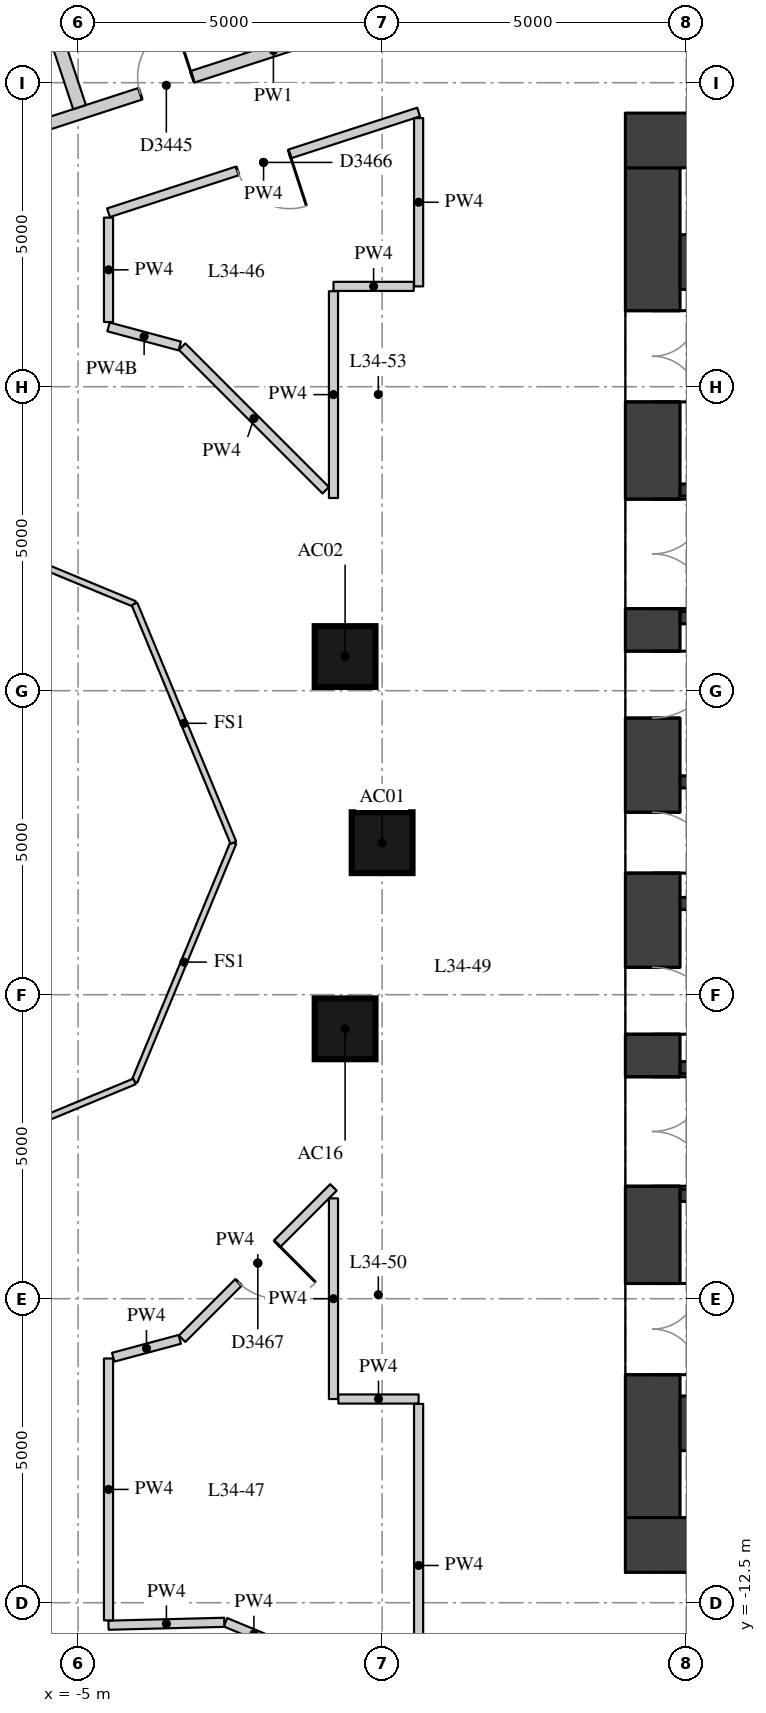
"""IFC4 building model, lengths in metres.
Left out: names, types, materials, properties, quantities, classifications, styles, units other than length and angle.
Written with IfcOpenShell. Run it as: python <this file> out.ifc"""

import sys

from ifc_helpers import new_model, si_unit, direction, frame, frame_2d, origin, origin_2d, place, context, subcontext, project, spatial, rectangle, extrude, element, fill, save


model = new_model("IFC4")
c1 = context("Model", 3, precision=1e-05, world=origin(), true_north=direction((0.0, 1.0)))
c2 = subcontext(c1, "Body", "Model", "MODEL_VIEW")
j1 = project(units=[si_unit("LENGTHUNIT", "METRE"), si_unit("PLANEANGLEUNIT", "RADIAN")], contexts=[c1])
p1 = place(None, origin())
s1 = spatial("IfcSite", under=j1, at=p1, CompositionType="ELEMENT")
p2 = place(p1, origin())
s2 = spatial("IfcBuilding", under=s1, at=p2, CompositionType="ELEMENT")
p3 = place(p2, frame((0.0, 0.0, 121.9)))
s3 = spatial("IfcBuildingStorey", under=s2, at=p3, CompositionType="ELEMENT", Elevation=121.9)
for number, where, z_axis, x_axis in (
    (1, (0.0, 0.0, 0.0), (0.0, 0.0, 1.0), (1.0, 0.0, 0.0)),
    (2, (-0.609, 3.062, 0.0), (0.0, 0.0, 1.0), (1.0, 0.0, 0.0)),
    (3, (-0.609, -3.062, 0.0), (0.0, 0.0, 1.0), (1.0, 0.0, 0.0)),
):
    element("IfcColumn", number, at=place(p3, frame(where, z_axis=z_axis, x_axis=x_axis)), inside=s3, PredefinedType="COLUMN", context=c2, shape_type="SweptSolid", body=[
        extrude(rectangle(XDim=1.0, YDim=1.0, at=origin_2d()), origin(), (0.0, 0.0, 1.0), 3.3),
    ])
p4 = place(p3, frame((4.45, -11.1, 0.0), z_axis=(0.0, 0.0, 1.0), x_axis=(0.0, 1.0, 0.0)))
e4 = element("IfcWall", 4, at=p4, inside=s3, PredefinedType="SHEAR", context=c2, shape_type="SweptSolid", body=[
    extrude(rectangle(XDim=22.2, YDim=0.9, at=frame_2d((11.1, 0.0))), origin(), (0.0, 0.0, 1.0), 3.02),
])
p5 = place(p4, frame((2.35, 0.0, 0.0)))
e5 = element("IfcOpeningElement", 5, at=p5, cuts=e4, PredefinedType="OPENING", context=c2, shape_type="SweptSolid", body=[
    extrude(rectangle(XDim=1.5, YDim=2.1, at=frame_2d((0.75, 1.05))), frame((0.0, 0.46, 0.0), z_axis=(0.0, -1.0, 0.0), x_axis=(1.0, 0.0, 0.0)), (0.0, 0.0, 1.0), 0.92),
])
p6 = place(p4, frame((5.45, 0.0, 0.0)))
e6 = element("IfcOpeningElement", 6, at=p6, cuts=e4, PredefinedType="OPENING", context=c2, shape_type="SweptSolid", body=[
    extrude(rectangle(XDim=1.8, YDim=2.1, at=frame_2d((0.9, 1.05))), frame((0.0, 0.46, 0.0), z_axis=(0.0, -1.0, 0.0), x_axis=(1.0, 0.0, 0.0)), (0.0, 0.0, 1.0), 0.92),
])
p7 = place(p4, frame((7.95, 0.0, 0.0)))
e7 = element("IfcOpeningElement", 7, at=p7, cuts=e4, PredefinedType="OPENING", context=c2, shape_type="SweptSolid", body=[
    extrude(rectangle(XDim=1.1, YDim=2.1, at=frame_2d((0.55, 1.05))), frame((0.0, 0.46, 0.0), z_axis=(0.0, -1.0, 0.0), x_axis=(1.0, 0.0, 0.0)), (0.0, 0.0, 1.0), 0.92),
])
p8 = place(p4, frame((10.6, 0.0, 0.0)))
e8 = element("IfcOpeningElement", 8, at=p8, cuts=e4, PredefinedType="OPENING", context=c2, shape_type="SweptSolid", body=[
    extrude(rectangle(XDim=1.0, YDim=2.1, at=frame_2d((0.5, 1.05))), frame((0.0, 0.46, 0.0), z_axis=(0.0, -1.0, 0.0), x_axis=(1.0, 0.0, 0.0)), (0.0, 0.0, 1.0), 0.92),
])
p9 = place(p4, frame((13.15, 0.0, 0.0)))
e9 = element("IfcOpeningElement", 9, at=p9, cuts=e4, PredefinedType="OPENING", context=c2, shape_type="SweptSolid", body=[
    extrude(rectangle(XDim=1.1, YDim=2.1, at=frame_2d((0.55, 1.05))), frame((0.0, 0.46, 0.0), z_axis=(0.0, -1.0, 0.0), x_axis=(1.0, 0.0, 0.0)), (0.0, 0.0, 1.0), 0.92),
])
p10 = place(p4, frame((14.95, 0.0, 0.0)))
e10 = element("IfcOpeningElement", 10, at=p10, cuts=e4, PredefinedType="OPENING", context=c2, shape_type="SweptSolid", body=[
    extrude(rectangle(XDim=1.8, YDim=2.1, at=frame_2d((0.9, 1.05))), frame((0.0, 0.46, 0.0), z_axis=(0.0, -1.0, 0.0), x_axis=(1.0, 0.0, 0.0)), (0.0, 0.0, 1.0), 0.92),
])
p11 = place(p4, frame((18.35, 0.0, 0.0)))
e11 = element("IfcOpeningElement", 11, at=p11, cuts=e4, PredefinedType="OPENING", context=c2, shape_type="SweptSolid", body=[
    extrude(rectangle(XDim=1.5, YDim=2.1, at=frame_2d((0.75, 1.05))), frame((0.0, 0.46, 0.0), z_axis=(0.0, -1.0, 0.0), x_axis=(1.0, 0.0, 0.0)), (0.0, 0.0, 1.0), 0.92),
])
for number, where, z_axis, x_axis in (
    (12, (4.0, 11.55, 0.0), (0.0, 0.0, 1.0), (1.0, 0.0, 0.0)),
    (13, (4.0, -11.55, 0.0), (0.0, 0.0, 1.0), (1.0, 0.0, 0.0)),
):
    element("IfcWall", number, at=place(p3, frame(where, z_axis=z_axis, x_axis=x_axis)), inside=s3, PredefinedType="SHEAR", context=c2, shape_type="SweptSolid", body=[
        extrude(rectangle(XDim=15.2, YDim=0.9, at=frame_2d((7.6, 0.0))), origin(), (0.0, 0.0, 1.0), 3.02),
    ])
for number, where, z_axis, x_axis in (
    (14, (4.9, 9.55, 0.0), (0.0, 0.0, 1.0), (1.0, 0.0, 0.0)),
    (15, (4.9, -9.55, 0.0), (0.0, 0.0, 1.0), (1.0, 0.0, 0.0)),
):
    element("IfcWall", number, at=place(p3, frame(where, z_axis=z_axis, x_axis=x_axis)), inside=s3, PredefinedType="SHEAR", context=c2, shape_type="SweptSolid", body=[
        extrude(rectangle(XDim=10.2, YDim=0.9, at=frame_2d((5.1, 0.0))), origin(), (0.0, 0.0, 1.0), 3.02),
    ])
p12 = place(p3, frame((4.9, 5.8, 0.0), z_axis=(0.0, 0.0, 1.0), x_axis=(1.0, 0.0, 0.0)))
e16 = element("IfcWall", 16, at=p12, inside=s3, PredefinedType="SHEAR", context=c2, shape_type="SweptSolid", body=[
    extrude(rectangle(XDim=10.2, YDim=0.2, at=frame_2d((5.1, 0.0))), origin(), (0.0, 0.0, 1.0), 3.02),
])
p13 = place(p12, frame((6.75, 0.0, 0.0)))
e17 = element("IfcOpeningElement", 17, at=p13, cuts=e16, PredefinedType="OPENING", context=c2, shape_type="SweptSolid", body=[
    extrude(rectangle(XDim=1.1, YDim=2.1, at=frame_2d((0.55, 1.05))), frame((0.0, 0.11, 0.0), z_axis=(0.0, -1.0, 0.0), x_axis=(1.0, 0.0, 0.0)), (0.0, 0.0, 1.0), 0.22),
])
p14 = place(p12, frame((8.75, 0.0, 0.0)))
e18 = element("IfcOpeningElement", 18, at=p14, cuts=e16, PredefinedType="OPENING", context=c2, shape_type="SweptSolid", body=[
    extrude(rectangle(XDim=1.1, YDim=2.1, at=frame_2d((0.55, 1.05))), frame((0.0, 0.11, 0.0), z_axis=(0.0, -1.0, 0.0), x_axis=(1.0, 0.0, 0.0)), (0.0, 0.0, 1.0), 0.22),
])
p15 = place(p3, frame((4.9, 3.7, 0.0), z_axis=(0.0, 0.0, 1.0), x_axis=(1.0, 0.0, 0.0)))
e19 = element("IfcWall", 19, at=p15, inside=s3, PredefinedType="SHEAR", context=c2, shape_type="SweptSolid", body=[
    extrude(rectangle(XDim=10.2, YDim=0.2, at=frame_2d((5.1, 0.0))), origin(), (0.0, 0.0, 1.0), 3.02),
])
p16 = place(p15, frame((6.3, 0.0, 0.0)))
e20 = element("IfcOpeningElement", 20, at=p16, cuts=e19, PredefinedType="OPENING", context=c2, shape_type="SweptSolid", body=[
    extrude(rectangle(XDim=1.1, YDim=2.1, at=frame_2d((0.55, 1.05))), frame((0.0, 0.11, 0.0), z_axis=(0.0, -1.0, 0.0), x_axis=(1.0, 0.0, 0.0)), (0.0, 0.0, 1.0), 0.22),
])
p17 = place(p15, frame((8.6, 0.0, 0.0)))
e21 = element("IfcOpeningElement", 21, at=p17, cuts=e19, PredefinedType="OPENING", context=c2, shape_type="SweptSolid", body=[
    extrude(rectangle(XDim=1.1, YDim=2.1, at=frame_2d((0.55, 1.05))), frame((0.0, 0.11, 0.0), z_axis=(0.0, -1.0, 0.0), x_axis=(1.0, 0.0, 0.0)), (0.0, 0.0, 1.0), 0.22),
])
for number, where, z_axis, x_axis in (
    (22, (4.9, 1.0, 0.0), (0.0, 0.0, 1.0), (1.0, 0.0, 0.0)),
    (23, (4.9, -1.0, 0.0), (0.0, 0.0, 1.0), (1.0, 0.0, 0.0)),
):
    element("IfcWall", number, at=place(p3, frame(where, z_axis=z_axis, x_axis=x_axis)), inside=s3, PredefinedType="SHEAR", context=c2, shape_type="SweptSolid", body=[
        extrude(rectangle(XDim=10.2, YDim=0.2, at=frame_2d((5.1, 0.0))), origin(), (0.0, 0.0, 1.0), 3.02),
    ])
p18 = place(p3, frame((4.9, -3.7, 0.0), z_axis=(0.0, 0.0, 1.0), x_axis=(1.0, 0.0, 0.0)))
e24 = element("IfcWall", 24, at=p18, inside=s3, PredefinedType="SHEAR", context=c2, shape_type="SweptSolid", body=[
    extrude(rectangle(XDim=10.2, YDim=0.2, at=frame_2d((5.1, 0.0))), origin(), (0.0, 0.0, 1.0), 3.02),
])
p19 = place(p18, frame((6.3, 0.0, 0.0)))
e25 = element("IfcOpeningElement", 25, at=p19, cuts=e24, PredefinedType="OPENING", context=c2, shape_type="SweptSolid", body=[
    extrude(rectangle(XDim=1.1, YDim=2.1, at=frame_2d((0.55, 1.05))), frame((0.0, 0.11, 0.0), z_axis=(0.0, -1.0, 0.0), x_axis=(1.0, 0.0, 0.0)), (0.0, 0.0, 1.0), 0.22),
])
p20 = place(p18, frame((8.6, 0.0, 0.0)))
e26 = element("IfcOpeningElement", 26, at=p20, cuts=e24, PredefinedType="OPENING", context=c2, shape_type="SweptSolid", body=[
    extrude(rectangle(XDim=1.1, YDim=2.1, at=frame_2d((0.55, 1.05))), frame((0.0, 0.11, 0.0), z_axis=(0.0, -1.0, 0.0), x_axis=(1.0, 0.0, 0.0)), (0.0, 0.0, 1.0), 0.22),
])
p21 = place(p3, frame((4.9, -5.8, 0.0), z_axis=(0.0, 0.0, 1.0), x_axis=(1.0, 0.0, 0.0)))
e27 = element("IfcWall", 27, at=p21, inside=s3, PredefinedType="SHEAR", context=c2, shape_type="SweptSolid", body=[
    extrude(rectangle(XDim=10.2, YDim=0.2, at=frame_2d((5.1, 0.0))), origin(), (0.0, 0.0, 1.0), 3.02),
])
p22 = place(p3, frame((-7.667, 11.119, 0.0), z_axis=(0.0, 0.0, 1.0), x_axis=(0.951088334028, 0.308919052304, 0.0)))
e28 = element("IfcWall", 28, at=p22, inside=s3, PredefinedType="PARTITIONING", context=c2, shape_type="SweptSolid", body=[
    extrude(rectangle(XDim=12.362, YDim=0.2, at=frame_2d((6.181, 0.0))), origin(), (0.0, 0.0, 1.0), 3.02),
])
p23 = place(p22, frame((7.686, 0.0, 0.0)))
e29 = element("IfcOpeningElement", 29, at=p23, cuts=e28, PredefinedType="OPENING", context=c2, shape_type="SweptSolid", body=[
    extrude(rectangle(XDim=1.1, YDim=2.1, at=frame_2d((0.55, 1.05))), frame((0.0, 0.11, 0.0), z_axis=(0.0, -1.0, 0.0), x_axis=(1.0, 0.0, 0.0)), (0.0, 0.0, 1.0), 0.22),
])
p24 = place(p22, frame((3.88, 0.0, 0.0)))
e30 = element("IfcOpeningElement", 30, at=p24, cuts=e28, PredefinedType="OPENING", context=c2, shape_type="SweptSolid", body=[
    extrude(rectangle(XDim=0.9, YDim=2.1, at=frame_2d((0.45, 1.05))), frame((0.0, 0.11, 0.0), z_axis=(0.0, -1.0, 0.0), x_axis=(1.0, 0.0, 0.0)), (0.0, 0.0, 1.0), 0.22),
])
p25 = place(p3, frame((-4.5, 10.361, 0.0), z_axis=(0.0, 0.0, 1.0), x_axis=(0.951090931116, 0.308911056372, 0.0)))
e31 = element("IfcWall", 31, at=p25, inside=s3, PredefinedType="PARTITIONING", context=c2, shape_type="SweptSolid", body=[
    extrude(rectangle(XDim=5.362, YDim=0.15, at=frame_2d((2.681, 0.0))), origin(), (0.0, 0.0, 1.0), 3.02),
])
p26 = place(p25, frame((2.231, 0.0, 0.0)))
e32 = element("IfcOpeningElement", 32, at=p26, cuts=e31, PredefinedType="OPENING", context=c2, shape_type="SweptSolid", body=[
    extrude(rectangle(XDim=0.9, YDim=2.1, at=frame_2d((0.45, 1.05))), frame((0.0, 0.085, 0.0), z_axis=(0.0, -1.0, 0.0), x_axis=(1.0, 0.0, 0.0)), (0.0, 0.0, 1.0), 0.17),
])
p27 = place(p3, frame((0.6, 11.917, 0.0), z_axis=(0.0, 0.0, 1.0), x_axis=(0.0, -1.0, 0.0)))
e33 = element("IfcWall", 33, at=p27, inside=s3, PredefinedType="PARTITIONING", context=c2, shape_type="SweptSolid", body=[
    extrude(rectangle(XDim=2.767, YDim=0.15, at=frame_2d((1.384, 0.0))), origin(), (0.0, 0.0, 1.0), 3.02),
])
p28 = place(p3, frame((0.52, 9.15, 0.0), z_axis=(0.0, 0.0, 1.0), x_axis=(-1.0, 0.0, 0.0)))
e34 = element("IfcWall", 34, at=p28, inside=s3, PredefinedType="PARTITIONING", context=c2, shape_type="SweptSolid", body=[
    extrude(rectangle(XDim=1.32, YDim=0.15, at=frame_2d((0.66, 0.0))), origin(), (0.0, 0.0, 1.0), 3.02),
])
p29 = place(p3, frame((-0.8, 9.07, 0.0), z_axis=(0.0, 0.0, 1.0), x_axis=(0.0, -1.0, 0.0)))
e35 = element("IfcWall", 35, at=p29, inside=s3, PredefinedType="PARTITIONING", context=c2, shape_type="SweptSolid", body=[
    extrude(rectangle(XDim=3.4, YDim=0.15, at=frame_2d((1.7, 0.0))), origin(), (0.0, 0.0, 1.0), 3.02),
])
p30 = place(p3, frame((-0.927, 5.797, 0.0), z_axis=(0.0, 0.0, 1.0), x_axis=(-0.707106781187, 0.707106781187, 0.0)))
e36 = element("IfcWall", 36, at=p30, inside=s3, PredefinedType="PARTITIONING", context=c2, shape_type="SweptSolid", body=[
    extrude(rectangle(XDim=3.341, YDim=0.15, at=frame_2d((1.67, 0.0))), origin(), (0.0, 0.0, 1.0), 3.02),
])
p31 = place(p3, frame((-3.328, 8.169, 0.0), z_axis=(0.0, 0.0, 1.0), x_axis=(-0.965933680277, 0.258789731841, 0.0)))
e37 = element("IfcWall", 37, at=p31, inside=s3, PredefinedType="PARTITIONING", context=c2, shape_type="SweptSolid", body=[
    extrude(rectangle(XDim=1.213, YDim=0.15, at=frame_2d((0.606, 0.0))), origin(), (0.0, 0.0, 1.0), 2.47),
])
p32 = place(p3, frame((-4.5, 8.563, 0.0), z_axis=(0.0, 0.0, 1.0), x_axis=(0.0, 1.0, 0.0)))
e38 = element("IfcWall", 38, at=p32, inside=s3, PredefinedType="PARTITIONING", context=c2, shape_type="SweptSolid", body=[
    extrude(rectangle(XDim=1.717, YDim=0.15, at=frame_2d((0.859, 0.0))), origin(), (0.0, 0.0, 1.0), 3.02),
])
p33 = place(p3, frame((-3.29, -8.159, 0.0), z_axis=(0.0, 0.0, 1.0), x_axis=(0.707106781187, 0.707106781187, 0.0)))
e39 = element("IfcWall", 39, at=p33, inside=s3, PredefinedType="PARTITIONING", context=c2, shape_type="SweptSolid", body=[
    extrude(rectangle(XDim=3.521, YDim=0.15, at=frame_2d((1.76, 0.0))), origin(), (0.0, 0.0, 1.0), 3.02),
])
p34 = place(p33, frame((1.31, 0.0, 0.0)))
e40 = element("IfcOpeningElement", 40, at=p34, cuts=e39, PredefinedType="OPENING", context=c2, shape_type="SweptSolid", body=[
    extrude(rectangle(XDim=0.9, YDim=2.1, at=frame_2d((0.45, 1.05))), frame((0.0, 0.085, 0.0), z_axis=(0.0, -1.0, 0.0), x_axis=(1.0, 0.0, 0.0)), (0.0, 0.0, 1.0), 0.17),
])
p35 = place(p3, frame((-0.8, -5.85, 0.0), z_axis=(0.0, 0.0, 1.0), x_axis=(0.0, -1.0, 0.0)))
e41 = element("IfcWall", 41, at=p35, inside=s3, PredefinedType="PARTITIONING", context=c2, shape_type="SweptSolid", body=[
    extrude(rectangle(XDim=3.3, YDim=0.15, at=frame_2d((1.65, 0.0))), origin(), (0.0, 0.0, 1.0), 3.02),
])
p36 = place(p3, frame((-0.72, -9.15, 0.0), z_axis=(0.0, 0.0, 1.0), x_axis=(1.0, 0.0, 0.0)))
e42 = element("IfcWall", 42, at=p36, inside=s3, PredefinedType="PARTITIONING", context=c2, shape_type="SweptSolid", body=[
    extrude(rectangle(XDim=1.32, YDim=0.15, at=frame_2d((0.66, 0.0))), origin(), (0.0, 0.0, 1.0), 3.02),
])
p37 = place(p3, frame((0.6, -9.23, 0.0), z_axis=(0.0, 0.0, 1.0), x_axis=(0.0, -1.0, 0.0)))
e43 = element("IfcWall", 43, at=p37, inside=s3, PredefinedType="PARTITIONING", context=c2, shape_type="SweptSolid", body=[
    extrude(rectangle(XDim=5.315, YDim=0.15, at=frame_2d((2.657, 0.0))), origin(), (0.0, 0.0, 1.0), 3.02),
])
p38 = place(p3, frame((-1.641, -13.209, 0.0), z_axis=(0.0, 0.0, 1.0), x_axis=(-0.923725449546, 0.383055209937, 0.0)))
e44 = element("IfcWall", 44, at=p38, inside=s3, PredefinedType="PARTITIONING", context=c2, shape_type="SweptSolid", body=[
    extrude(rectangle(XDim=1.011, YDim=0.15, at=frame_2d((0.506, 0.0))), origin(), (0.0, 0.0, 1.0), 3.02),
])
p39 = place(p3, frame((-2.596, -12.823, 0.0), z_axis=(0.0, 0.0, 1.0), x_axis=(-0.999684436087, -0.025120275573, 0.0)))
e45 = element("IfcWall", 45, at=p39, inside=s3, PredefinedType="PARTITIONING", context=c2, shape_type="SweptSolid", body=[
    extrude(rectangle(XDim=1.905, YDim=0.15, at=frame_2d((0.952, 0.0))), origin(), (0.0, 0.0, 1.0), 3.02),
])
p40 = place(p3, frame((-4.5, -12.79, 0.0), z_axis=(0.0, 0.0, 1.0), x_axis=(0.0, 1.0, 0.0)))
e46 = element("IfcWall", 46, at=p40, inside=s3, PredefinedType="PARTITIONING", context=c2, shape_type="SweptSolid", body=[
    extrude(rectangle(XDim=4.307, YDim=0.15, at=frame_2d((2.154, 0.0))), origin(), (0.0, 0.0, 1.0), 3.02),
])
p41 = place(p3, frame((-4.423, -8.463, 0.0), z_axis=(0.0, 0.0, 1.0), x_axis=(0.965898042479, 0.258922713439, 0.0)))
e47 = element("IfcWall", 47, at=p41, inside=s3, PredefinedType="PARTITIONING", context=c2, shape_type="SweptSolid", body=[
    extrude(rectangle(XDim=1.133, YDim=0.15, at=frame_2d((0.567, 0.0))), origin(), (0.0, 0.0, 1.0), 3.02),
])
p42 = place(p3, frame((-7.469, 19.622, 0.0), z_axis=(0.0, 0.0, 1.0), x_axis=(0.314545340174, -0.949242450049, 0.0)))
e48 = element("IfcWall", 48, at=p42, inside=s3, PredefinedType="PARTITIONING", context=c2, shape_type="SweptSolid", body=[
    extrude(rectangle(XDim=7.926, YDim=0.22, at=frame_2d((3.963, 0.0))), origin(), (0.0, 0.0, 1.0), 3.02),
])
for number, where, z_axis, x_axis in (
    (49, (-2.446, 0.0, 0.0), (0.0, 0.0, 1.0), (-0.383, -0.924, 0.0)),
    (50, (-4.073, -3.927, 0.0), (0.0, 0.0, 1.0), (-0.924, -0.383, 0.0)),
    (51, (-8.0, 5.554, 0.0), (0.0, 0.0, 1.0), (0.924, -0.383, 0.0)),
    (52, (-4.073, 3.927, 0.0), (0.0, 0.0, 1.0), (0.383, -0.924, 0.0)),
):
    element("IfcWall", number, at=place(p3, frame(where, z_axis=z_axis, x_axis=x_axis)), inside=s3, PredefinedType="PARTITIONING", context=c2, shape_type="SweptSolid", body=[
        extrude(rectangle(XDim=4.251, YDim=0.1, at=frame_2d((2.125, 0.0))), origin(), (0.0, 0.0, 1.0), 3.02),
    ])
p43 = place(p5, origin())
e53 = element("IfcDoor", 53, at=p43, inside=s3, OperationType="DOUBLE_DOOR_SINGLE_SWING", PredefinedType="DOOR", context=c2, shape_type="SweptSolid", body=[
    extrude(rectangle(XDim=1.5, YDim=2.1, at=frame_2d((0.75, 1.05))), frame((0.0, 0.025, 0.0), z_axis=(0.0, -1.0, 0.0), x_axis=(1.0, 0.0, 0.0)), (0.0, 0.0, 1.0), 0.05),
])
fill(e5, e53)
p44 = place(p6, origin())
e54 = element("IfcDoor", 54, at=p44, inside=s3, OperationType="DOUBLE_DOOR_SINGLE_SWING", PredefinedType="DOOR", context=c2, shape_type="SweptSolid", body=[
    extrude(rectangle(XDim=1.8, YDim=2.1, at=frame_2d((0.9, 1.05))), frame((0.0, 0.025, 0.0), z_axis=(0.0, -1.0, 0.0), x_axis=(1.0, 0.0, 0.0)), (0.0, 0.0, 1.0), 0.05),
])
fill(e6, e54)
p45 = place(p7, origin())
e55 = element("IfcDoor", 55, at=p45, inside=s3, OperationType="SINGLE_SWING_RIGHT", PredefinedType="DOOR", context=c2, shape_type="SweptSolid", body=[
    extrude(rectangle(XDim=1.1, YDim=2.1, at=frame_2d((0.55, 1.05))), frame((0.0, 0.025, 0.0), z_axis=(0.0, -1.0, 0.0), x_axis=(1.0, 0.0, 0.0)), (0.0, 0.0, 1.0), 0.05),
])
fill(e7, e55)
p46 = place(p8, origin())
e56 = element("IfcDoor", 56, at=p46, inside=s3, OperationType="SINGLE_SWING_RIGHT", PredefinedType="DOOR", context=c2, shape_type="SweptSolid", body=[
    extrude(rectangle(XDim=1.0, YDim=2.1, at=frame_2d((0.5, 1.05))), frame((0.0, 0.025, 0.0), z_axis=(0.0, -1.0, 0.0), x_axis=(1.0, 0.0, 0.0)), (0.0, 0.0, 1.0), 0.05),
])
fill(e8, e56)
p47 = place(p9, origin())
e57 = element("IfcDoor", 57, at=p47, inside=s3, OperationType="SINGLE_SWING_LEFT", PredefinedType="DOOR", context=c2, shape_type="SweptSolid", body=[
    extrude(rectangle(XDim=1.1, YDim=2.1, at=frame_2d((0.55, 1.05))), frame((0.0, 0.025, 0.0), z_axis=(0.0, -1.0, 0.0), x_axis=(1.0, 0.0, 0.0)), (0.0, 0.0, 1.0), 0.05),
])
fill(e9, e57)
p48 = place(p10, origin())
e58 = element("IfcDoor", 58, at=p48, inside=s3, OperationType="DOUBLE_DOOR_SINGLE_SWING", PredefinedType="DOOR", context=c2, shape_type="SweptSolid", body=[
    extrude(rectangle(XDim=1.8, YDim=2.1, at=frame_2d((0.9, 1.05))), frame((0.0, 0.025, 0.0), z_axis=(0.0, -1.0, 0.0), x_axis=(1.0, 0.0, 0.0)), (0.0, 0.0, 1.0), 0.05),
])
fill(e10, e58)
p49 = place(p11, origin())
e59 = element("IfcDoor", 59, at=p49, inside=s3, OperationType="DOUBLE_DOOR_SINGLE_SWING", PredefinedType="DOOR", context=c2, shape_type="SweptSolid", body=[
    extrude(rectangle(XDim=1.5, YDim=2.1, at=frame_2d((0.75, 1.05))), frame((0.0, 0.025, 0.0), z_axis=(0.0, -1.0, 0.0), x_axis=(1.0, 0.0, 0.0)), (0.0, 0.0, 1.0), 0.05),
])
fill(e11, e59)
p50 = place(p24, origin())
e60 = element("IfcDoor", 60, at=p50, inside=s3, OperationType="SINGLE_SWING_RIGHT", PredefinedType="DOOR", context=c2, shape_type="SweptSolid", body=[
    extrude(rectangle(XDim=0.9, YDim=2.1, at=frame_2d((0.45, 1.05))), frame((0.0, 0.025, 0.0), z_axis=(0.0, -1.0, 0.0), x_axis=(1.0, 0.0, 0.0)), (0.0, 0.0, 1.0), 0.05),
])
fill(e30, e60)
p51 = place(p26, origin())
e61 = element("IfcDoor", 61, at=p51, inside=s3, OperationType="SINGLE_SWING_LEFT", PredefinedType="DOOR", context=c2, shape_type="SweptSolid", body=[
    extrude(rectangle(XDim=0.9, YDim=2.1, at=frame_2d((0.45, 1.05))), frame((0.0, 0.025, 0.0), z_axis=(0.0, -1.0, 0.0), x_axis=(1.0, 0.0, 0.0)), (0.0, 0.0, 1.0), 0.05),
])
fill(e32, e61)
p52 = place(p34, origin())
e62 = element("IfcDoor", 62, at=p52, inside=s3, OperationType="SINGLE_SWING_LEFT", PredefinedType="DOOR", context=c2, shape_type="SweptSolid", body=[
    extrude(rectangle(XDim=0.9, YDim=2.1, at=frame_2d((0.45, 1.05))), frame((0.0, 0.025, 0.0), z_axis=(0.0, -1.0, 0.0), x_axis=(1.0, 0.0, 0.0)), (0.0, 0.0, 1.0), 0.05),
])
fill(e40, e62)
save(model, sys.argv[1])
